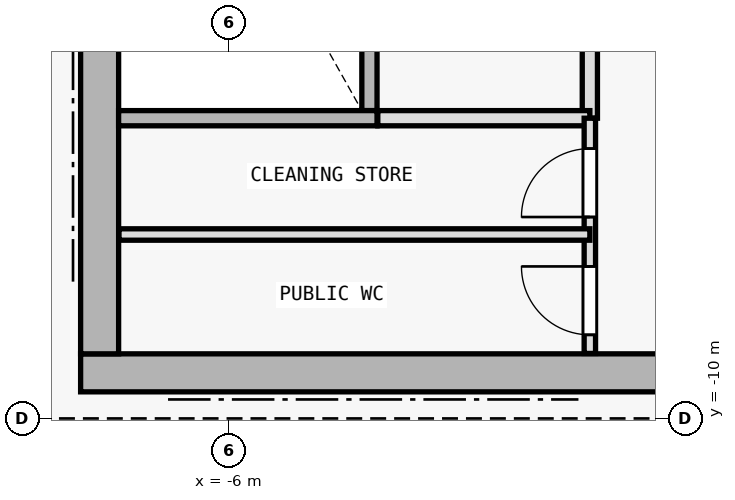
"""IFC4 building model, lengths in metres.
Left out: names, types, materials, properties, quantities, classifications, styles, units other than length and angle.
Written with IfcOpenShell. Run it as: python <this file> out.ifc"""

import sys

from ifc_helpers import new_model, si_unit, direction, frame, frame_2d, origin, origin_2d, place, context, subcontext, project, spatial, rectangle, i_section, extrude, element, fill, save


model = new_model("IFC4")
c1 = context("Model", 3, precision=1e-05, world=origin(), true_north=direction((0.0, 1.0)))
c2 = subcontext(c1, "Body", "Model", "MODEL_VIEW")
j1 = project(units=[si_unit("LENGTHUNIT", "METRE"), si_unit("PLANEANGLEUNIT", "RADIAN")], contexts=[c1])
p1 = place(None, origin())
s1 = spatial("IfcSite", under=j1, at=p1, CompositionType="ELEMENT")
p2 = place(p1, origin())
s2 = spatial("IfcBuilding", under=s1, at=p2, CompositionType="ELEMENT")
p3 = place(p2, frame((0.0, 0.0, 234.3)))
s3 = spatial("IfcBuildingStorey", under=s2, at=p3, CompositionType="ELEMENT", Elevation=234.3)
p4 = place(p3, frame((-7.7, -9.4, 0.0), z_axis=(0.0, 0.0, 1.0), x_axis=(1.0, 0.0, 0.0)))
e1 = element("IfcColumn", 1, at=p4, inside=s3, PredefinedType="COLUMN", context=c2, shape_type="SweptSolid", body=[
    extrude(i_section(OverallWidth=0.398, OverallDepth=0.387, WebThickness=0.013, FlangeThickness=0.022, FilletRadius=0.015, at=origin_2d()), origin(), (0.0, 0.0, 1.0), 3.6),
])
p5 = place(p3, frame((-7.95, -9.4, 0.0), z_axis=(0.0, 0.0, 1.0), x_axis=(1.0, 0.0, 0.0)))
e2 = element("IfcWall", 2, at=p5, inside=s3, PredefinedType="SHEAR", context=c2, shape_type="SweptSolid", body=[
    extrude(rectangle(XDim=15.9, YDim=0.5, at=frame_2d((7.95, 0.0))), origin(), (0.0, 0.0, 1.0), 3.35),
])
p6 = place(p5, frame((9.6, 0.0, 0.0)))
e3 = element("IfcOpeningElement", 3, at=p6, cuts=e2, PredefinedType="OPENING", context=c2, shape_type="SweptSolid", body=[
    extrude(rectangle(XDim=1.5, YDim=2.2, at=frame_2d((0.75, 1.1))), frame((0.0, 0.26, 0.0), z_axis=(0.0, -1.0, 0.0), x_axis=(1.0, 0.0, 0.0)), (0.0, 0.0, 1.0), 0.52),
])
p7 = place(p3, frame((-7.7, -9.15, 0.0), z_axis=(0.0, 0.0, 1.0), x_axis=(0.0, 1.0, 0.0)))
e4 = element("IfcWall", 4, at=p7, inside=s3, PredefinedType="SHEAR", context=c2, shape_type="SweptSolid", body=[
    extrude(rectangle(XDim=19.1, YDim=0.5, at=frame_2d((9.55, 0.0))), origin(), (0.0, 0.0, 1.0), 3.35),
])
p8 = place(p7, frame((12.7, 0.0, 0.0)))
e5 = element("IfcOpeningElement", 5, at=p8, cuts=e4, PredefinedType="OPENING", context=c2, shape_type="SweptSolid", body=[
    extrude(rectangle(XDim=1.1, YDim=2.15, at=frame_2d((0.55, 1.075))), frame((0.0, 0.26, 0.0), z_axis=(0.0, -1.0, 0.0), x_axis=(1.0, 0.0, 0.0)), (0.0, 0.0, 1.0), 0.52),
])
p9 = place(p3, frame((-4.15, -5.95, 0.0), z_axis=(0.0, 0.0, 1.0), x_axis=(0.0, 1.0, 0.0)))
e6 = element("IfcWall", 6, at=p9, inside=s3, PredefinedType="SOLIDWALL", context=c2, shape_type="SweptSolid", body=[
    extrude(rectangle(XDim=7.2, YDim=0.2, at=frame_2d((3.6, 0.0))), origin(), (0.0, 0.0, 1.0), 3.35),
])
p10 = place(p3, frame((-1.25, -6.05, 0.0), z_axis=(0.0, 0.0, 1.0), x_axis=(0.0, 1.0, 0.0)))
e7 = element("IfcWall", 7, at=p10, inside=s3, PredefinedType="SOLIDWALL", context=c2, shape_type="SweptSolid", body=[
    extrude(rectangle(XDim=8.7, YDim=0.2, at=frame_2d((4.35, 0.0))), origin(), (0.0, 0.0, 1.0), 3.35),
])
p11 = place(p10, frame((3.4, 0.0, 0.0)))
e8 = element("IfcOpeningElement", 8, at=p11, cuts=e7, PredefinedType="OPENING", context=c2, shape_type="SweptSolid", body=[
    extrude(rectangle(XDim=0.95, YDim=2.1, at=frame_2d((0.475, 1.05))), frame((0.0, 0.11, 0.0), z_axis=(0.0, -1.0, 0.0), x_axis=(1.0, 0.0, 0.0)), (0.0, 0.0, 1.0), 0.22),
])
p12 = place(p3, frame((-7.45, -6.05, 0.0), z_axis=(0.0, 0.0, 1.0), x_axis=(1.0, 0.0, 0.0)))
e9 = element("IfcWall", 9, at=p12, inside=s3, PredefinedType="SOLIDWALL", context=c2, shape_type="SweptSolid", body=[
    extrude(rectangle(XDim=3.4, YDim=0.2, at=frame_2d((1.7, 0.0))), origin(), (0.0, 0.0, 1.0), 3.35),
])
p13 = place(p3, frame((-4.04, -6.05, 0.0), z_axis=(0.0, 0.0, 1.0), x_axis=(1.0, 0.0, 0.0)))
e10 = element("IfcWall", 10, at=p13, inside=s3, PredefinedType="SOLIDWALL", context=c2, shape_type="SweptSolid", body=[
    extrude(rectangle(XDim=2.79, YDim=0.2, at=frame_2d((1.395, 0.0))), origin(), (0.0, 0.0, 1.0), 3.35),
])
p14 = place(p3, frame((-1.25, -9.145, 0.0), z_axis=(0.0, 0.0, 1.0), x_axis=(0.0, 1.0, 0.0)))
e11 = element("IfcWall", 11, at=p14, inside=s3, PredefinedType="PARTITIONING", context=c2, shape_type="SweptSolid", body=[
    extrude(rectangle(XDim=3.095, YDim=0.15, at=frame_2d((1.547, 0.0))), origin(), (0.0, 0.0, 1.0), 3.35),
])
p15 = place(p14, frame((1.795, 0.0, 0.0)))
e12 = element("IfcOpeningElement", 12, at=p15, cuts=e11, PredefinedType="OPENING", context=c2, shape_type="SweptSolid", body=[
    extrude(rectangle(XDim=0.9, YDim=2.1, at=frame_2d((0.45, 1.05))), frame((0.0, 0.085, 0.0), z_axis=(0.0, -1.0, 0.0), x_axis=(1.0, 0.0, 0.0)), (0.0, 0.0, 1.0), 0.17),
])
p16 = place(p14, frame((0.245, 0.0, 0.0)))
e13 = element("IfcOpeningElement", 13, at=p16, cuts=e11, PredefinedType="OPENING", context=c2, shape_type="SweptSolid", body=[
    extrude(rectangle(XDim=0.9, YDim=2.1, at=frame_2d((0.45, 1.05))), frame((0.0, 0.085, 0.0), z_axis=(0.0, -1.0, 0.0), x_axis=(1.0, 0.0, 0.0)), (0.0, 0.0, 1.0), 0.17),
])
p17 = place(p3, frame((-7.445, -7.58, 0.0), z_axis=(0.0, 0.0, 1.0), x_axis=(1.0, 0.0, 0.0)))
e14 = element("IfcWall", 14, at=p17, inside=s3, PredefinedType="PARTITIONING", context=c2, shape_type="SweptSolid", body=[
    extrude(rectangle(XDim=6.195, YDim=0.15, at=frame_2d((3.098, 0.0))), origin(), (0.0, 0.0, 1.0), 3.35),
])
p18 = place(p15, origin())
e15 = element("IfcDoor", 15, at=p18, inside=s3, OperationType="SINGLE_SWING_LEFT", PredefinedType="DOOR", context=c2, shape_type="SweptSolid", body=[
    extrude(rectangle(XDim=0.9, YDim=2.1, at=frame_2d((0.45, 1.05))), frame((0.0, 0.025, 0.0), z_axis=(0.0, -1.0, 0.0), x_axis=(1.0, 0.0, 0.0)), (0.0, 0.0, 1.0), 0.05),
])
fill(e12, e15)
p19 = place(p16, origin())
e16 = element("IfcDoor", 16, at=p19, inside=s3, OperationType="SINGLE_SWING_RIGHT", PredefinedType="DOOR", context=c2, shape_type="SweptSolid", body=[
    extrude(rectangle(XDim=0.9, YDim=2.1, at=frame_2d((0.45, 1.05))), frame((0.0, 0.025, 0.0), z_axis=(0.0, -1.0, 0.0), x_axis=(1.0, 0.0, 0.0)), (0.0, 0.0, 1.0), 0.05),
])
fill(e13, e16)
save(model, sys.argv[1])
